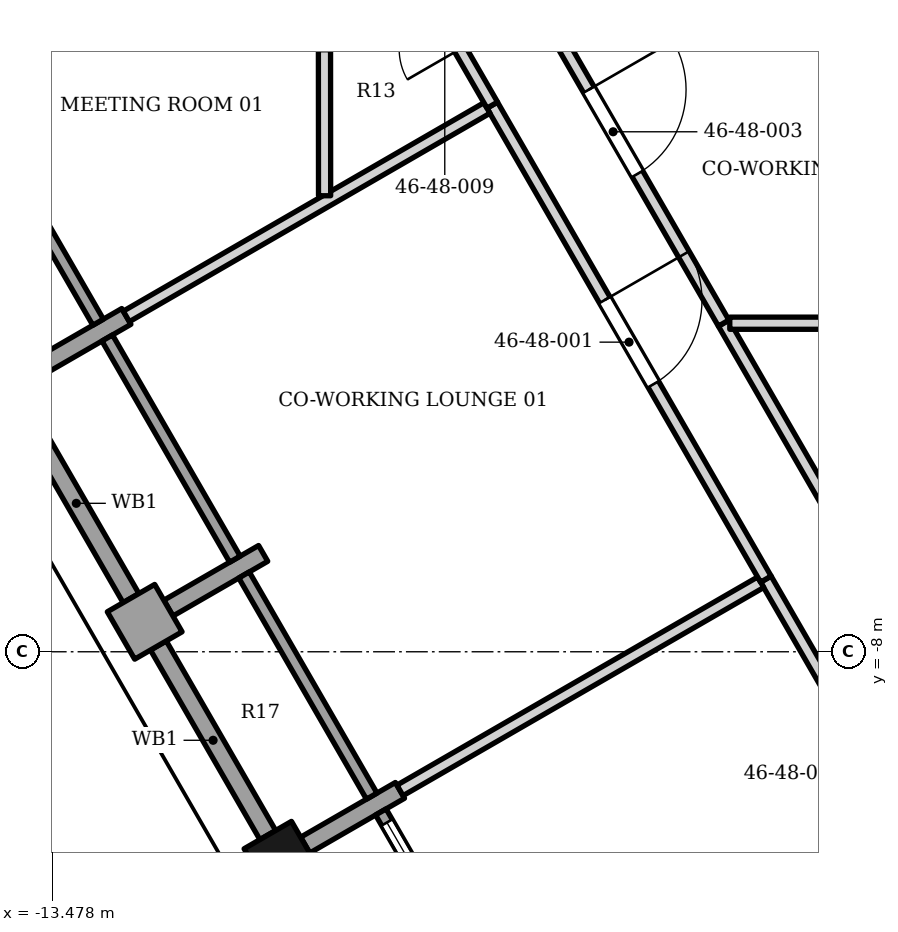
"""IFC4 building model, lengths in metres.
Left out: names, types, materials, properties, quantities, classifications, styles, units other than length and angle.
Written with IfcOpenShell. Run it as: python <this file> out.ifc"""

import sys

from ifc_helpers import new_model, si_unit, direction, frame, frame_2d, origin, origin_2d, place, context, subcontext, project, spatial, rectangle, extrude, element, fill, save


model = new_model("IFC4")
c1 = context("Model", 3, precision=1e-05, world=origin(), true_north=direction((0.0, 1.0)))
c2 = subcontext(c1, "Body", "Model", "MODEL_VIEW")
j1 = project(units=[si_unit("LENGTHUNIT", "METRE"), si_unit("PLANEANGLEUNIT", "RADIAN")], contexts=[c1])
p1 = place(None, origin())
s1 = spatial("IfcSite", under=j1, at=p1, CompositionType="ELEMENT")
p2 = place(p1, origin())
s2 = spatial("IfcBuilding", under=s1, at=p2, CompositionType="ELEMENT")
p3 = place(p2, frame((0.0, 0.0, 196.4)))
s3 = spatial("IfcBuildingStorey", under=s2, at=p3, CompositionType="ELEMENT", Elevation=196.4)
p4 = place(p3, frame((-9.707, -11.404, 0.0), z_axis=(0.0, 0.0, 1.0), x_axis=(0.5, -0.866025403784, 0.0)))
e1 = element("IfcColumn", 1, at=p4, inside=s3, PredefinedType="COLUMN", context=c2, shape_type="SweptSolid", body=[
    extrude(rectangle(XDim=0.9, YDim=0.9, at=origin_2d()), origin(), (0.0, 0.0, 1.0), 3.9),
])
p5 = place(p3, frame((-13.817, -3.385, 0.0), z_axis=(0.0, 0.0, 1.0), x_axis=(0.865989075817, 0.500062916607, 0.0)))
e2 = element("IfcWall", 2, at=p5, inside=s3, PredefinedType="SOLIDWALL", context=c2, shape_type="SweptSolid", body=[
    extrude(rectangle(XDim=1.8, YDim=0.3, at=frame_2d((0.9, 0.0))), origin(), (0.0, 0.0, 1.0), 3.0),
])
p6 = place(p3, frame((-12.182, -7.118, 0.0), z_axis=(0.0, 0.0, 1.0), x_axis=(0.50001992892, -0.866013897511, 0.0)))
e3 = element("IfcWall", 3, at=p6, inside=s3, PredefinedType="SOLIDWALL", context=c2, shape_type="SweptSolid", body=[
    extrude(rectangle(XDim=0.9, YDim=0.9, at=frame_2d((0.45, 0.0))), origin(), (0.0, 0.0, 1.0), 3.0),
])
for number, where, z_axis, x_axis in (
    (4, (-11.567, -7.282, 0.0), (0.0, 0.0, 1.0), (0.866, 0.5, 0.0)),
    (5, (-9.317, -11.179, 0.0), (0.0, 0.0, 1.0), (0.866, 0.5, 0.0)),
):
    element("IfcWall", number, at=place(p3, frame(where, z_axis=z_axis, x_axis=x_axis)), inside=s3, PredefinedType="SOLIDWALL", context=c2, shape_type="SweptSolid", body=[
        extrude(rectangle(XDim=1.8, YDim=0.3, at=frame_2d((0.9, 0.0))), origin(), (0.0, 0.0, 1.0), 3.0),
    ])
p7 = place(p3, frame((-14.823, 1.057, 0.0), z_axis=(0.0, 0.0, 1.0), x_axis=(0.500002543286, -0.866023935413, 0.0)))
e6 = element("IfcWall", 6, at=p7, inside=s3, PredefinedType="ELEMENTEDWALL", context=c2, shape_type="SweptSolid", body=[
    extrude(rectangle(XDim=4.2, YDim=0.2, at=frame_2d((2.1, 0.0))), origin(), (0.0, 0.0, 1.0), 3.0),
])
p8 = place(p3, frame((-13.982, -4.0, 0.0), z_axis=(0.0, 0.0, 1.0), x_axis=(0.500012057535, -0.866018442252, 0.0)))
e7 = element("IfcWall", 7, at=p8, inside=s3, PredefinedType="SOLIDWALL", context=c2, shape_type="SweptSolid", body=[
    extrude(rectangle(XDim=3.6, YDim=0.3, at=frame_2d((1.8, 0.0))), origin(), (0.0, 0.0, 1.0), 3.0),
])
p9 = place(p3, frame((-12.573, -2.84, 0.0), z_axis=(0.0, 0.0, 1.0), x_axis=(0.500027713859, -0.866009402589, 0.0)))
e8 = element("IfcWall", 8, at=p9, inside=s3, PredefinedType="ELEMENTEDWALL", context=c2, shape_type="SweptSolid", body=[
    extrude(rectangle(XDim=4.2, YDim=0.2, at=frame_2d((2.1, 0.0))), origin(), (0.0, 0.0, 1.0), 3.0),
])
p10 = place(p3, frame((-9.932, -11.014, 0.0), z_axis=(0.0, 0.0, 1.0), x_axis=(-0.50001992892, 0.866013897511, 0.0)))
e9 = element("IfcWall", 9, at=p10, inside=s3, PredefinedType="SOLIDWALL", context=c2, shape_type="SweptSolid", body=[
    extrude(rectangle(XDim=3.599, YDim=0.3, at=frame_2d((1.8, 0.0))), origin(), (0.0, 0.0, 1.0), 3.0),
])
p11 = place(p3, frame((-10.323, -6.737, 0.0), z_axis=(0.0, 0.0, 1.0), x_axis=(0.500027713859, -0.866009402589, 0.0)))
e10 = element("IfcWall", 10, at=p11, inside=s3, PredefinedType="ELEMENTEDWALL", context=c2, shape_type="SweptSolid", body=[
    extrude(rectangle(XDim=4.2, YDim=0.2, at=frame_2d((2.1, 0.0))), origin(), (0.0, 0.0, 1.0), 3.0),
])
p12 = place(p3, frame((-8.073, -10.634, 0.0), z_axis=(0.0, 0.0, 1.0), x_axis=(0.500002543286, -0.866023935413, 0.0)))
e11 = element("IfcWall", 11, at=p12, inside=s3, PredefinedType="ELEMENTEDWALL", context=c2, shape_type="SweptSolid", body=[
    extrude(rectangle(XDim=4.2, YDim=0.2, at=frame_2d((2.1, 0.0))), origin(), (0.0, 0.0, 1.0), 2.95),
])
p13 = place(p12, frame((0.2, 0.0, 0.45)))
e12 = element("IfcOpeningElement", 12, at=p13, cuts=e11, PredefinedType="OPENING", context=c2, shape_type="SweptSolid", body=[
    extrude(rectangle(XDim=2.4, YDim=2.25, at=frame_2d((1.2, 1.125))), frame((0.0, 0.11, 0.0), z_axis=(0.0, -1.0, 0.0), x_axis=(1.0, 0.0, 0.0)), (0.0, 0.0, 1.0), 0.22),
])
p14 = place(p12, frame((2.8, 0.0, 0.0)))
e13 = element("IfcOpeningElement", 13, at=p14, cuts=e11, PredefinedType="OPENING", context=c2, shape_type="SweptSolid", body=[
    extrude(rectangle(XDim=1.2, YDim=2.7, at=frame_2d((0.6, 1.35))), frame((0.0, 0.11, 0.0), z_axis=(0.0, -1.0, 0.0), x_axis=(1.0, 0.0, 0.0)), (0.0, 0.0, 1.0), 0.22),
])
p15 = place(p3, frame((-1.74, -6.806, 0.0), z_axis=(0.0, 0.0, 1.0), x_axis=(0.500136329277, -0.865946679731, 0.0)))
e14 = element("IfcWall", 14, at=p15, inside=s3, PredefinedType="PARTITIONING", context=c2, shape_type="SweptSolid", body=[
    extrude(rectangle(XDim=8.408, YDim=0.2, at=frame_2d((4.204, 0.0))), origin(), (0.0, 0.0, 1.0), 2.884),
])
p16 = place(p15, frame((2.804, 0.0, 0.0)))
e15 = element("IfcOpeningElement", 15, at=p16, cuts=e14, PredefinedType="OPENING", context=c2, shape_type="SweptSolid", body=[
    extrude(rectangle(XDim=1.8, YDim=2.4, at=frame_2d((0.9, 1.2))), frame((0.0, 0.11, 0.0), z_axis=(0.0, -1.0, 0.0), x_axis=(1.0, 0.0, 0.0)), (0.0, 0.0, 1.0), 0.22),
])
p17 = place(p3, frame((-7.758, -10.28, 0.0), z_axis=(0.0, 0.0, 1.0), x_axis=(0.866142857868, 0.499796508355, 0.0)))
e16 = element("IfcWall", 16, at=p17, inside=s3, PredefinedType="PARTITIONING", context=c2, shape_type="SweptSolid", body=[
    extrude(rectangle(XDim=6.849, YDim=0.2, at=frame_2d((3.425, 0.0))), origin(), (0.0, 0.0, 1.0), 2.884),
])
p18 = place(p3, frame((-6.241, 0.989, 0.0), z_axis=(0.0, 0.0, 1.0), x_axis=(0.5000018851, -0.866024315419, 0.0)))
e17 = element("IfcWall", 17, at=p18, inside=s3, PredefinedType="PARTITIONING", context=c2, shape_type="SweptSolid", body=[
    extrude(rectangle(XDim=9.0, YDim=0.2, at=frame_2d((4.5, 0.0))), origin(), (0.0, 0.0, 1.0), 2.884),
])
p19 = place(p18, frame((3.7, 0.0, 0.0)))
e18 = element("IfcOpeningElement", 18, at=p19, cuts=e17, PredefinedType="OPENING", context=c2, shape_type="SweptSolid", body=[
    extrude(rectangle(XDim=1.6, YDim=2.1, at=frame_2d((0.8, 1.05))), frame((0.0, 0.11, 0.0), z_axis=(0.0, -1.0, 0.0), x_axis=(1.0, 0.0, 0.0)), (0.0, 0.0, 1.0), 0.22),
])
p20 = place(p3, frame((-2.434, -2.597, 0.0), z_axis=(0.0, 0.0, 1.0), x_axis=(0.499860458914, -0.86610595288, 0.0)))
e19 = element("IfcWall", 19, at=p20, inside=s3, PredefinedType="PARTITIONING", context=c2, shape_type="SweptSolid", body=[
    extrude(rectangle(XDim=9.801, YDim=0.2, at=frame_2d((4.9, 0.0))), origin(), (0.0, 0.0, 1.0), 2.884),
])
p21 = place(p20, frame((4.449, 0.0, 0.0)))
e20 = element("IfcOpeningElement", 20, at=p21, cuts=e19, PredefinedType="OPENING", context=c2, shape_type="SweptSolid", body=[
    extrude(rectangle(XDim=0.9, YDim=2.1, at=frame_2d((0.45, 1.05))), frame((0.0, 0.11, 0.0), z_axis=(0.0, -1.0, 0.0), x_axis=(1.0, 0.0, 0.0)), (0.0, 0.0, 1.0), 0.22),
])
p22 = place(p3, frame((-2.334, -2.597, 0.0), z_axis=(0.0, 0.0, 1.0), x_axis=(1.0, 0.0, 0.0)))
e21 = element("IfcWall", 21, at=p22, inside=s3, PredefinedType="PARTITIONING", context=c2, shape_type="SweptSolid", body=[
    extrude(rectangle(XDim=4.949, YDim=0.2, at=frame_2d((2.475, 0.0))), origin(), (0.0, 0.0, 1.0), 2.884),
])
p23 = place(p3, frame((-12.258, -2.485, 0.0), z_axis=(0.0, 0.0, 1.0), x_axis=(0.865815661702, 0.500363108105, 0.0)))
e22 = element("IfcWall", 22, at=p23, inside=s3, PredefinedType="PARTITIONING", context=c2, shape_type="SweptSolid", body=[
    extrude(rectangle(XDim=6.85, YDim=0.2, at=frame_2d((3.425, 0.0))), origin(), (0.0, 0.0, 1.0), 3.052),
])
p24 = place(p3, frame((-7.804, 3.699, 0.0), z_axis=(0.0, 0.0, 1.0), x_axis=(0.50003316619, -0.866006254429, 0.0)))
e23 = element("IfcWall", 23, at=p24, inside=s3, PredefinedType="PARTITIONING", context=c2, shape_type="SweptSolid", body=[
    extrude(rectangle(XDim=3.129, YDim=0.2, at=frame_2d((1.564, 0.0))), origin(), (0.0, 0.0, 1.0), 3.73),
])
p25 = place(p24, frame((1.065, 0.0, 0.0)))
e24 = element("IfcOpeningElement", 24, at=p25, cuts=e23, PredefinedType="OPENING", context=c2, shape_type="SweptSolid", body=[
    extrude(rectangle(XDim=1.0, YDim=2.1, at=frame_2d((0.5, 1.05))), frame((0.0, 0.11, 0.0), z_axis=(0.0, -1.0, 0.0), x_axis=(1.0, 0.0, 0.0)), (0.0, 0.0, 1.0), 0.22),
])
p26 = place(p3, frame((-9.0, 1.9, 0.0), z_axis=(0.0, 0.0, 1.0), x_axis=(0.000711888358, -0.999999746607, 0.0)))
e25 = element("IfcWall", 25, at=p26, inside=s3, PredefinedType="PARTITIONING", context=c2, shape_type="SweptSolid", body=[
    extrude(rectangle(XDim=2.401, YDim=0.2, at=frame_2d((1.2, 0.0))), origin(), (0.0, 0.0, 1.0), 3.052),
])
p27 = place(p3, frame((-6.072, 3.7, 0.0), z_axis=(0.0, 0.0, 1.0), x_axis=(0.50020597598, -0.865906450833, 0.0)))
e26 = element("IfcWall", 26, at=p27, inside=s3, PredefinedType="PARTITIONING", context=c2, shape_type="SweptSolid", body=[
    extrude(rectangle(XDim=7.27, YDim=0.2, at=frame_2d((3.635, 0.0))), origin(), (0.0, 0.0, 1.0), 2.884),
])
p28 = place(p27, frame((2.836, 0.0, 0.0)))
e27 = element("IfcOpeningElement", 27, at=p28, cuts=e26, PredefinedType="OPENING", context=c2, shape_type="SweptSolid", body=[
    extrude(rectangle(XDim=1.6, YDim=2.1, at=frame_2d((0.8, 1.05))), frame((0.0, 0.11, 0.0), z_axis=(0.0, -1.0, 0.0), x_axis=(1.0, 0.0, 0.0)), (0.0, 0.0, 1.0), 0.22),
])
p29 = place(p13, origin())
e28 = element("IfcWindow", 28, at=p29, inside=s3, PartitioningType="SINGLE_PANEL", PredefinedType="WINDOW", context=c2, shape_type="SweptSolid", body=[
    extrude(rectangle(XDim=2.4, YDim=2.25, at=frame_2d((1.2, 1.125))), frame((0.0, 0.03, 0.0), z_axis=(0.0, -1.0, 0.0), x_axis=(1.0, 0.0, 0.0)), (0.0, 0.0, 1.0), 0.06),
])
fill(e12, e28)
p30 = place(p19, origin())
e29 = element("IfcDoor", 29, at=p30, inside=s3, OperationType="DOUBLE_DOOR_SINGLE_SWING", PredefinedType="DOOR", context=c2, shape_type="SweptSolid", body=[
    extrude(rectangle(XDim=1.6, YDim=2.1, at=frame_2d((0.8, 1.05))), frame((0.0, 0.025, 0.0), z_axis=(0.0, -1.0, 0.0), x_axis=(1.0, 0.0, 0.0)), (0.0, 0.0, 1.0), 0.05),
])
fill(e18, e29)
p31 = place(p28, origin())
e30 = element("IfcDoor", 30, at=p31, inside=s3, OperationType="DOUBLE_DOOR_SINGLE_SWING", PredefinedType="DOOR", context=c2, shape_type="SweptSolid", body=[
    extrude(rectangle(XDim=1.6, YDim=2.1, at=frame_2d((0.8, 1.05))), frame((0.0, 0.025, 0.0), z_axis=(0.0, -1.0, 0.0), x_axis=(1.0, 0.0, 0.0)), (0.0, 0.0, 1.0), 0.05),
])
fill(e27, e30)
save(model, sys.argv[1])
